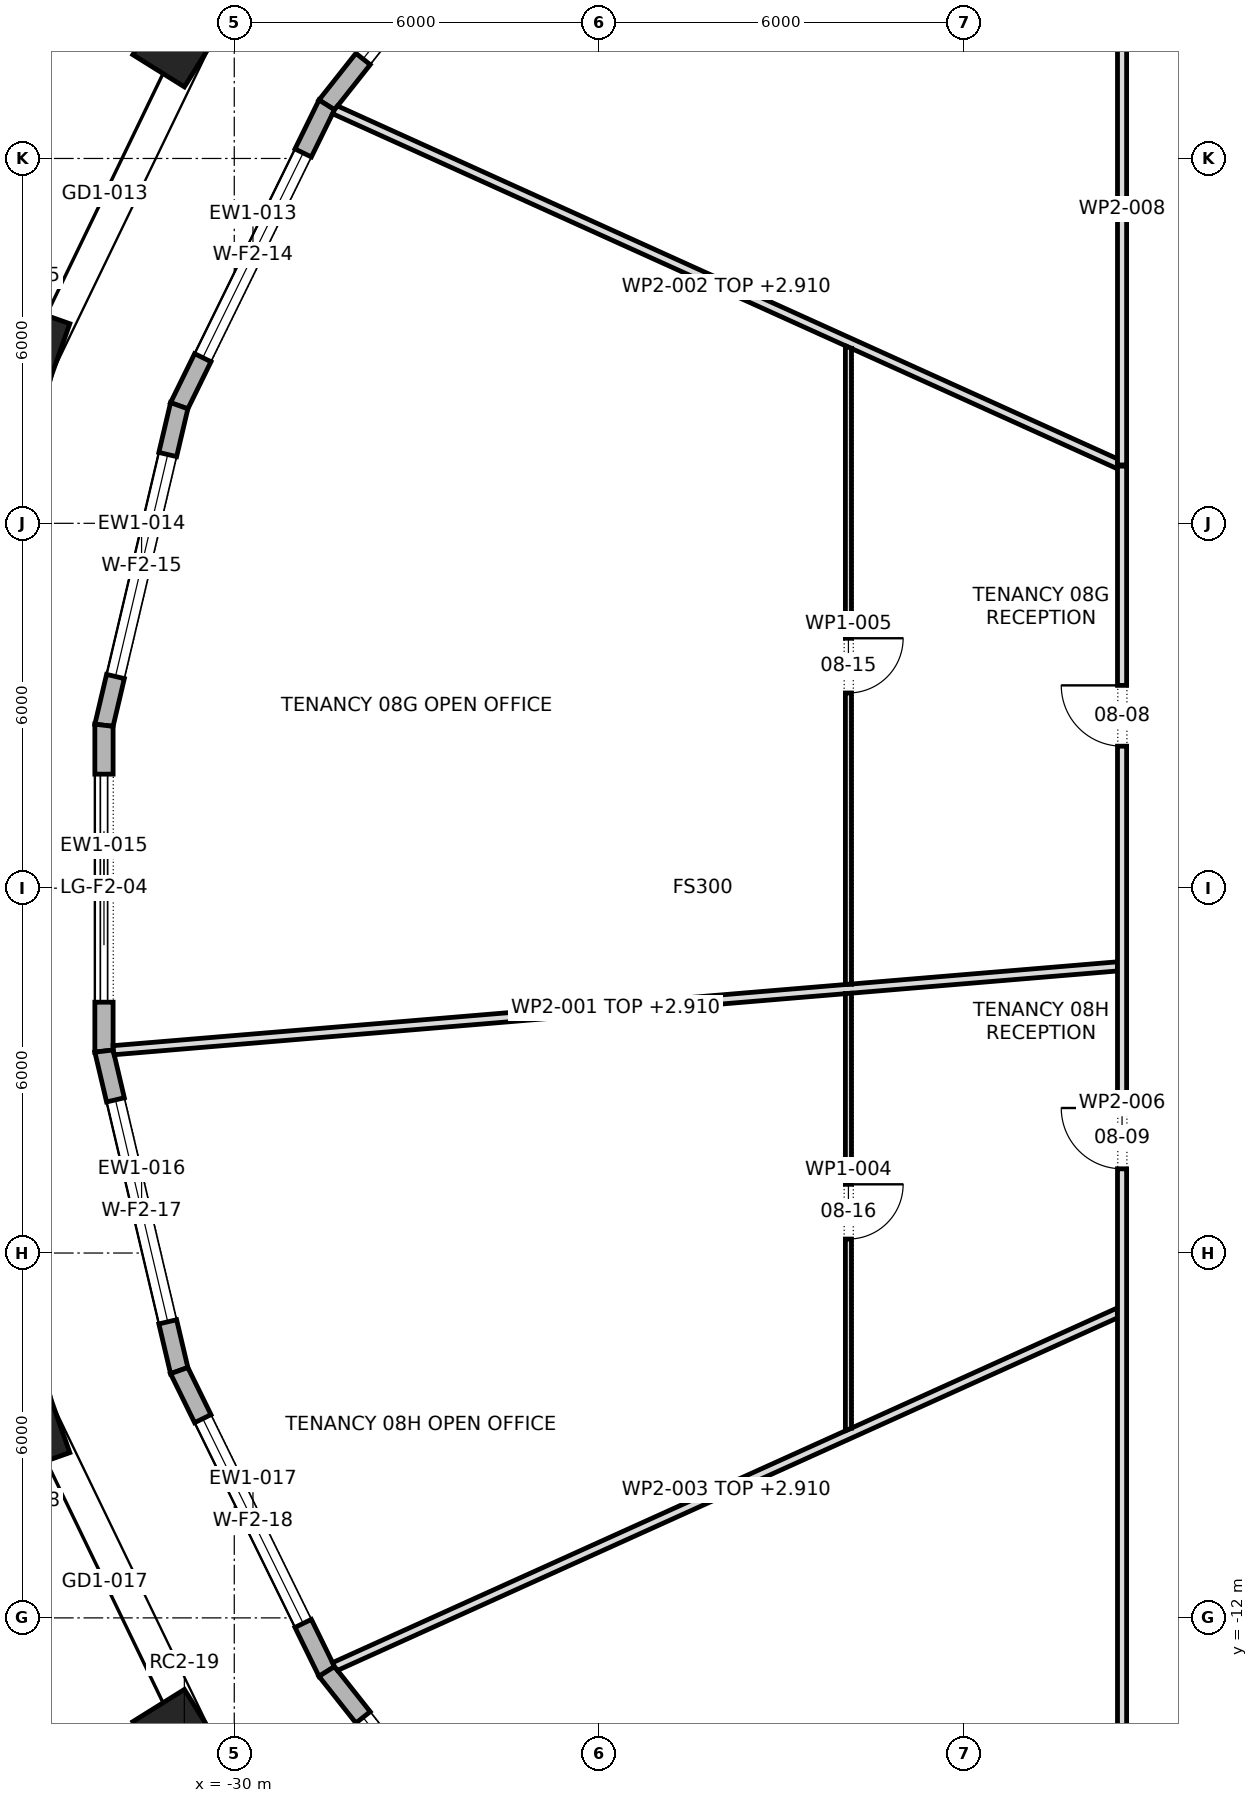
"""IFC4 building model, lengths in metres.
Left out: names, types, materials, properties, quantities, classifications, styles, units other than length and angle.
Written with IfcOpenShell. Run it as: python <this file> out.ifc"""

import sys

from ifc_helpers import new_model, si_unit, direction, frame, frame_2d, origin, origin_2d, place, context, subcontext, project, spatial, polyline, rectangle, outline, extrude, element, fill, save


model = new_model("IFC4")
c1 = context("Model", 3, precision=1e-05, world=origin(), true_north=direction((0.0, 1.0)))
c2 = subcontext(c1, "Body", "Model", "MODEL_VIEW")
j1 = project(units=[si_unit("LENGTHUNIT", "METRE"), si_unit("PLANEANGLEUNIT", "RADIAN")], contexts=[c1])
p1 = place(None, origin())
s1 = spatial("IfcSite", under=j1, at=p1, CompositionType="ELEMENT")
p2 = place(p1, origin())
s2 = spatial("IfcBuilding", under=s1, at=p2, CompositionType="ELEMENT")
p3 = place(p2, frame((0.0, 0.0, 117.1)))
s3 = spatial("IfcBuildingStorey", under=s2, at=p3, CompositionType="ELEMENT", Elevation=117.1)
for number, where, z_axis, x_axis in (
    (1, (-30.821, 14.121, 0.0), (0.0, 0.0, 1.0), (-0.529, -0.849, 0.0)),
    (2, (-33.443, 8.695, 0.0), (0.0, 0.0, 1.0), (-0.334, -0.943, 0.0)),
    (3, (-33.443, -8.695, 0.0), (0.0, 0.0, 1.0), (0.334, -0.943, 0.0)),
    (4, (-30.821, -14.121, 0.0), (0.0, 0.0, 1.0), (0.529, -0.849, 0.0)),
):
    element("IfcColumn", number, at=place(p3, frame(where, z_axis=z_axis, x_axis=x_axis)), inside=s3, PredefinedType="COLUMN", context=c2, shape_type="SweptSolid", body=[
        extrude(rectangle(XDim=1.6, YDim=1.0, at=origin_2d()), origin(), (0.0, 0.0, 1.0), 4.2),
    ])
p4 = place(p3, frame((-24.958, 17.332, 0.0), z_axis=(0.0, 0.0, 1.0), x_axis=(-0.62038332391, -0.784298751379, 0.0)))
e5 = element("IfcWall", 5, at=p4, inside=s3, PredefinedType="STANDARD", context=c2, shape_type="SweptSolid", body=[
    extrude(outline(polyline([(-0.015, -0.15), (5.691, -0.15), (5.659, 0.15), (0.015, 0.15), (-0.015, -0.15)])), origin(), (0.0, 0.0, 1.0), 3.9),
])
p5 = place(p4, frame((0.962, 0.0, 0.6)))
e6 = element("IfcOpeningElement", 6, at=p5, cuts=e5, PredefinedType="OPENING", context=c2, shape_type="SweptSolid", body=[
    extrude(rectangle(XDim=3.75, YDim=2.85, at=frame_2d((1.875, 1.425))), frame((0.0, 0.162, 0.0), z_axis=(0.0, -1.0, 0.0), x_axis=(1.0, 0.0, 0.0)), (0.0, 0.0, 1.0), 0.324),
])
p6 = place(p3, frame((-28.479, 12.881, 0.0), z_axis=(0.0, 0.0, 1.0), x_axis=(-0.440306401535, -0.897847577692, 0.0)))
e7 = element("IfcWall", 7, at=p6, inside=s3, PredefinedType="STANDARD", context=c2, shape_type="SweptSolid", body=[
    extrude(outline(polyline([(-0.016, -0.15), (5.527, -0.15), (5.494, 0.15), (0.016, 0.15), (-0.016, -0.15)])), origin(), (0.0, 0.0, 1.0), 3.9),
])
p7 = place(p6, frame((0.88, 0.0, 0.6)))
e8 = element("IfcOpeningElement", 8, at=p7, cuts=e7, PredefinedType="OPENING", context=c2, shape_type="SweptSolid", body=[
    extrude(rectangle(XDim=3.75, YDim=2.85, at=frame_2d((1.875, 1.425))), frame((0.0, 0.162, 0.0), z_axis=(0.0, -1.0, 0.0), x_axis=(1.0, 0.0, 0.0)), (0.0, 0.0, 1.0), 0.324),
])
p8 = place(p3, frame((-30.905, 7.934, 0.0), z_axis=(0.0, 0.0, 1.0), x_axis=(-0.229200658045, -0.973379195561, 0.0)))
e9 = element("IfcWall", 9, at=p8, inside=s3, PredefinedType="STANDARD", context=c2, shape_type="SweptSolid", body=[
    extrude(outline(polyline([(-0.017, -0.15), (5.416, -0.15), (5.381, 0.15), (0.017, 0.15), (-0.017, -0.15)])), origin(), (0.0, 0.0, 1.0), 3.9),
])
p9 = place(p8, frame((0.824, 0.0, 0.6)))
e10 = element("IfcOpeningElement", 10, at=p9, cuts=e9, PredefinedType="OPENING", context=c2, shape_type="SweptSolid", body=[
    extrude(rectangle(XDim=3.75, YDim=2.85, at=frame_2d((1.875, 1.425))), frame((0.0, 0.162, 0.0), z_axis=(0.0, -1.0, 0.0), x_axis=(1.0, 0.0, 0.0)), (0.0, 0.0, 1.0), 0.324),
])
p10 = place(p3, frame((-32.143, 2.679, 0.0), z_axis=(0.0, 0.0, 1.0), x_axis=(0.0, -1.0, 0.0)))
e11 = element("IfcWall", 11, at=p10, inside=s3, PredefinedType="STANDARD", context=c2, shape_type="SweptSolid", body=[
    extrude(outline(polyline([(-0.017, -0.15), (5.375, -0.15), (5.341, 0.15), (0.017, 0.15), (-0.017, -0.15)])), origin(), (0.0, 0.0, 1.0), 3.9),
])
p11 = place(p10, frame((0.804, 0.0, 0.0)))
e12 = element("IfcOpeningElement", 12, at=p11, cuts=e11, PredefinedType="OPENING", context=c2, shape_type="SweptSolid", body=[
    extrude(rectangle(XDim=3.75, YDim=3.45, at=frame_2d((1.875, 1.725))), frame((0.0, 0.162, 0.0), z_axis=(0.0, -1.0, 0.0), x_axis=(1.0, 0.0, 0.0)), (0.0, 0.0, 1.0), 0.324),
])
p12 = place(p3, frame((-32.143, -2.679, 0.0), z_axis=(0.0, 0.0, 1.0), x_axis=(0.229200658045, -0.973379195561, 0.0)))
e13 = element("IfcWall", 13, at=p12, inside=s3, PredefinedType="STANDARD", context=c2, shape_type="SweptSolid", body=[
    extrude(outline(polyline([(-0.017, -0.15), (5.415, -0.15), (5.382, 0.15), (0.017, 0.15), (-0.017, -0.15)])), origin(), (0.0, 0.0, 1.0), 3.9),
])
p13 = place(p12, frame((0.824, 0.0, 0.6)))
e14 = element("IfcOpeningElement", 14, at=p13, cuts=e13, PredefinedType="OPENING", context=c2, shape_type="SweptSolid", body=[
    extrude(rectangle(XDim=3.75, YDim=2.85, at=frame_2d((1.875, 1.425))), frame((0.0, 0.162, 0.0), z_axis=(0.0, -1.0, 0.0), x_axis=(1.0, 0.0, 0.0)), (0.0, 0.0, 1.0), 0.324),
])
p14 = place(p3, frame((-30.905, -7.934, 0.0), z_axis=(0.0, 0.0, 1.0), x_axis=(0.440306401535, -0.897847577692, 0.0)))
e15 = element("IfcWall", 15, at=p14, inside=s3, PredefinedType="STANDARD", context=c2, shape_type="SweptSolid", body=[
    extrude(outline(polyline([(-0.017, -0.15), (5.527, -0.15), (5.494, 0.15), (0.017, 0.15), (-0.017, -0.15)])), origin(), (0.0, 0.0, 1.0), 3.9),
])
p15 = place(p14, frame((0.88, 0.0, 0.6)))
e16 = element("IfcOpeningElement", 16, at=p15, cuts=e15, PredefinedType="OPENING", context=c2, shape_type="SweptSolid", body=[
    extrude(rectangle(XDim=3.75, YDim=2.85, at=frame_2d((1.875, 1.425))), frame((0.0, 0.162, 0.0), z_axis=(0.0, -1.0, 0.0), x_axis=(1.0, 0.0, 0.0)), (0.0, 0.0, 1.0), 0.324),
])
p16 = place(p3, frame((-28.479, -12.881, 0.0), z_axis=(0.0, 0.0, 1.0), x_axis=(0.62038332391, -0.784298751379, 0.0)))
e17 = element("IfcWall", 17, at=p16, inside=s3, PredefinedType="STANDARD", context=c2, shape_type="SweptSolid", body=[
    extrude(outline(polyline([(-0.016, -0.15), (5.69, -0.15), (5.66, 0.15), (0.016, 0.15), (-0.016, -0.15)])), origin(), (0.0, 0.0, 1.0), 3.9),
])
p17 = place(p16, frame((0.962, 0.0, 0.6)))
e18 = element("IfcOpeningElement", 18, at=p17, cuts=e17, PredefinedType="OPENING", context=c2, shape_type="SweptSolid", body=[
    extrude(rectangle(XDim=3.75, YDim=2.85, at=frame_2d((1.875, 1.425))), frame((0.0, 0.162, 0.0), z_axis=(0.0, -1.0, 0.0), x_axis=(1.0, 0.0, 0.0)), (0.0, 0.0, 1.0), 0.324),
])
p18 = place(p3, frame((-31.986, -2.665, 0.0), z_axis=(0.0, 0.0, 1.0), x_axis=(0.996533353756, 0.083194199634, 0.0)))
e19 = element("IfcWall", 19, at=p18, inside=s3, PredefinedType="PARTITIONING", context=c2, shape_type="SweptSolid", body=[
    extrude(outline(polyline([(0.006, -0.075), (1.729, -0.075), (3.453, -0.075), (5.177, -0.075), (6.901, -0.075), (8.625, -0.075), (10.348, -0.075), (12.072, -0.075), (12.072, -0.075), (12.074, -0.075), (13.57, -0.075), (15.066, -0.075), (16.562, -0.075), (16.574, 0.068), (16.574, 0.075), (15.111, 0.075), (13.648, 0.075), (12.185, 0.075), (12.185, 0.074), (12.172, 0.075), (10.433, 0.075), (8.694, 0.075), (6.955, 0.075), (5.216, 0.075), (3.478, 0.075), (1.739, 0.075), (0.0, 0.075), (0.0, -0.036), (0.006, -0.075)])), origin(), (0.0, 0.0, 1.0), 2.91),
])
p19 = place(p3, frame((-28.352, 12.804, 0.0), z_axis=(0.0, 0.0, 1.0), x_axis=(0.91107802929, -0.412233943951, 0.0)))
e20 = element("IfcWall", 20, at=p19, inside=s3, PredefinedType="PARTITIONING", context=c2, shape_type="SweptSolid", body=[
    extrude(outline(polyline([(0.0, -0.075), (1.872, -0.075), (3.744, -0.075), (5.616, -0.075), (7.488, -0.075), (9.36, -0.075), (9.365, -0.073), (9.365, -0.075), (10.966, -0.075), (12.567, -0.075), (14.167, -0.075), (14.167, -0.075), (14.145, -0.025), (14.1, 0.075), (12.34, 0.075), (10.58, 0.075), (8.82, 0.075), (7.06, 0.075), (5.301, 0.075), (3.541, 0.075), (1.781, 0.075), (0.021, 0.075), (0.002, -0.003), (0.0, -0.059), (0.0, -0.075)])), origin(), (0.0, 0.0, 1.0), 2.91),
])
p20 = place(p3, frame((-28.352, -12.804, 0.0), z_axis=(0.0, 0.0, 1.0), x_axis=(0.911239169411, 0.41187762276, 0.0)))
e21 = element("IfcWall", 21, at=p20, inside=s3, PredefinedType="PARTITIONING", context=c2, shape_type="SweptSolid", body=[
    extrude(outline(polyline([(0.022, -0.075), (1.781, -0.075), (3.541, -0.075), (5.3, -0.075), (7.06, -0.075), (8.819, -0.075), (10.579, -0.075), (12.338, -0.075), (14.098, -0.075), (14.166, 0.075), (12.565, 0.075), (10.965, 0.075), (9.364, 0.075), (9.364, 0.074), (9.362, 0.075), (7.49, 0.075), (5.617, 0.075), (3.745, 0.075), (1.873, 0.075), (0.0, 0.075), (0.0, 0.074), (0.002, 0.003), (0.022, -0.075)])), origin(), (0.0, 0.0, 1.0), 2.91),
])
p21 = place(p3, frame((-19.9, -8.924, 0.0), z_axis=(0.0, 0.0, 1.0), x_axis=(0.0, 1.0, 0.0)))
e22 = element("IfcWall", 22, at=p21, inside=s3, PredefinedType="PARTITIONING", context=c2, shape_type="SweptSolid", body=[
    extrude(outline(polyline([(7.197, -0.05), (7.197, -0.046), (7.189, 0.05), (5.392, 0.05), (3.594, 0.05), (1.797, 0.05), (0.0, 0.05), (0.0, 0.05), (0.045, -0.05), (1.833, -0.05), (3.621, -0.05), (5.409, -0.05), (7.197, -0.05)])), origin(), (0.0, 0.0, 1.0), 3.9),
])
p22 = place(p21, frame((3.154, 0.0, 0.0)))
e23 = element("IfcOpeningElement", 23, at=p22, cuts=e22, PredefinedType="OPENING", context=c2, shape_type="SweptSolid", body=[
    extrude(rectangle(XDim=0.9, YDim=2.1, at=frame_2d((0.45, 1.05))), frame((0.0, 0.062, 0.0), z_axis=(0.0, -1.0, 0.0), x_axis=(1.0, 0.0, 0.0)), (0.0, 0.0, 1.0), 0.124),
])
p23 = place(p3, frame((-19.9, -1.584, 0.0), z_axis=(0.0, 0.0, 1.0), x_axis=(0.0, 1.0, 0.0)))
e24 = element("IfcWall", 24, at=p23, inside=s3, PredefinedType="PARTITIONING", context=c2, shape_type="SweptSolid", body=[
    extrude(outline(polyline([(0.008, -0.05), (1.75, -0.05), (3.492, -0.05), (5.234, -0.05), (6.976, -0.05), (8.718, -0.05), (10.459, -0.05), (10.504, 0.049), (10.504, 0.05), (8.754, 0.05), (7.003, 0.05), (5.252, 0.05), (3.501, 0.05), (1.751, 0.05), (0.0, 0.05), (0.0, 0.048), (0.008, -0.05)])), origin(), (0.0, 0.0, 1.0), 3.9),
])
p24 = place(p23, frame((4.794, 0.0, 0.0)))
e25 = element("IfcOpeningElement", 25, at=p24, cuts=e24, PredefinedType="OPENING", context=c2, shape_type="SweptSolid", body=[
    extrude(rectangle(XDim=0.9, YDim=2.1, at=frame_2d((0.45, 1.05))), frame((0.0, 0.062, 0.0), z_axis=(0.0, -1.0, 0.0), x_axis=(1.0, 0.0, 0.0)), (0.0, 0.0, 1.0), 0.124),
])
p25 = place(p3, frame((-15.4, -15.475, 0.0), z_axis=(0.0, 0.0, 1.0), x_axis=(0.0, 1.0, 0.0)))
e26 = element("IfcWall", 26, at=p25, inside=s3, PredefinedType="PARTITIONING", context=c2, shape_type="SweptSolid", body=[
    extrude(outline(polyline([(22.425, 0.075), (20.556, 0.075), (18.688, 0.075), (16.819, 0.075), (14.95, 0.075), (13.081, 0.075), (11.213, 0.075), (9.344, 0.075), (7.475, 0.075), (5.606, 0.075), (3.738, 0.075), (1.869, 0.075), (0.0, 0.075), (0.15, -0.075), (2.006, -0.075), (3.863, -0.075), (5.719, -0.075), (7.575, -0.075), (9.431, -0.075), (11.288, -0.075), (13.144, -0.075), (15.0, -0.075), (16.856, -0.075), (18.713, -0.075), (20.569, -0.075), (22.425, -0.075), (22.425, 0.075)])), origin(), (0.0, 0.0, 1.0), 3.9),
])
p26 = place(p25, frame((17.81, 0.0, 0.0)))
e27 = element("IfcOpeningElement", 27, at=p26, cuts=e26, PredefinedType="OPENING", context=c2, shape_type="SweptSolid", body=[
    extrude(rectangle(XDim=1.0, YDim=2.1, at=frame_2d((0.5, 1.05))), frame((0.0, 0.087, 0.0), z_axis=(0.0, -1.0, 0.0), x_axis=(1.0, 0.0, 0.0)), (0.0, 0.0, 1.0), 0.174),
])
p27 = place(p25, frame((10.86, 0.0, 0.0)))
e28 = element("IfcOpeningElement", 28, at=p27, cuts=e26, PredefinedType="OPENING", context=c2, shape_type="SweptSolid", body=[
    extrude(rectangle(XDim=1.0, YDim=2.1, at=frame_2d((0.5, 1.05))), frame((0.0, 0.087, 0.0), z_axis=(0.0, -1.0, 0.0), x_axis=(1.0, 0.0, 0.0)), (0.0, 0.0, 1.0), 0.174),
])
p28 = place(p3, frame((-15.4, 6.95, 0.0), z_axis=(0.0, 0.0, 1.0), x_axis=(0.0, 1.0, 0.0)))
e29 = element("IfcWall", 29, at=p28, inside=s3, PredefinedType="PARTITIONING", context=c2, shape_type="SweptSolid", body=[
    extrude(outline(polyline([(0.0, -0.075), (1.675, -0.075), (3.35, -0.075), (5.025, -0.075), (6.7, -0.075), (8.375, -0.075), (8.525, 0.075), (6.82, 0.075), (5.115, 0.075), (3.41, 0.075), (1.705, 0.075), (0.0, 0.075), (0.0, -0.075)])), origin(), (0.0, 0.0, 1.0), 3.9),
])
p29 = place(p5, origin())
e30 = element("IfcWindow", 30, at=p29, inside=s3, PartitioningType="TRIPLE_PANEL_VERTICAL", PredefinedType="WINDOW", context=c2, shape_type="SweptSolid", body=[
    extrude(rectangle(XDim=3.75, YDim=2.85, at=frame_2d((1.875, 1.425))), frame((0.0, 0.03, 0.0), z_axis=(0.0, -1.0, 0.0), x_axis=(1.0, 0.0, 0.0)), (0.0, 0.0, 1.0), 0.06),
])
fill(e6, e30)
p30 = place(p7, origin())
e31 = element("IfcWindow", 31, at=p30, inside=s3, PartitioningType="TRIPLE_PANEL_VERTICAL", PredefinedType="WINDOW", context=c2, shape_type="SweptSolid", body=[
    extrude(rectangle(XDim=3.75, YDim=2.85, at=frame_2d((1.875, 1.425))), frame((0.0, 0.03, 0.0), z_axis=(0.0, -1.0, 0.0), x_axis=(1.0, 0.0, 0.0)), (0.0, 0.0, 1.0), 0.06),
])
fill(e8, e31)
p31 = place(p9, origin())
e32 = element("IfcWindow", 32, at=p31, inside=s3, PartitioningType="TRIPLE_PANEL_VERTICAL", PredefinedType="WINDOW", context=c2, shape_type="SweptSolid", body=[
    extrude(rectangle(XDim=3.75, YDim=2.85, at=frame_2d((1.875, 1.425))), frame((0.0, 0.03, 0.0), z_axis=(0.0, -1.0, 0.0), x_axis=(1.0, 0.0, 0.0)), (0.0, 0.0, 1.0), 0.06),
])
fill(e10, e32)
p32 = place(p11, origin())
e33 = element("IfcDoor", 33, at=p32, inside=s3, OperationType="DOUBLE_DOOR_SLIDING", PredefinedType="DOOR", context=c2, shape_type="SweptSolid", body=[
    extrude(rectangle(XDim=3.75, YDim=3.45, at=frame_2d((1.875, 1.725))), frame((0.0, 0.025, 0.0), z_axis=(0.0, -1.0, 0.0), x_axis=(1.0, 0.0, 0.0)), (0.0, 0.0, 1.0), 0.05),
])
fill(e12, e33)
p33 = place(p13, origin())
e34 = element("IfcWindow", 34, at=p33, inside=s3, PartitioningType="TRIPLE_PANEL_VERTICAL", PredefinedType="WINDOW", context=c2, shape_type="SweptSolid", body=[
    extrude(rectangle(XDim=3.75, YDim=2.85, at=frame_2d((1.875, 1.425))), frame((0.0, 0.03, 0.0), z_axis=(0.0, -1.0, 0.0), x_axis=(1.0, 0.0, 0.0)), (0.0, 0.0, 1.0), 0.06),
])
fill(e14, e34)
p34 = place(p15, origin())
e35 = element("IfcWindow", 35, at=p34, inside=s3, PartitioningType="TRIPLE_PANEL_VERTICAL", PredefinedType="WINDOW", context=c2, shape_type="SweptSolid", body=[
    extrude(rectangle(XDim=3.75, YDim=2.85, at=frame_2d((1.875, 1.425))), frame((0.0, 0.03, 0.0), z_axis=(0.0, -1.0, 0.0), x_axis=(1.0, 0.0, 0.0)), (0.0, 0.0, 1.0), 0.06),
])
fill(e16, e35)
p35 = place(p17, origin())
e36 = element("IfcWindow", 36, at=p35, inside=s3, PartitioningType="TRIPLE_PANEL_VERTICAL", PredefinedType="WINDOW", context=c2, shape_type="SweptSolid", body=[
    extrude(rectangle(XDim=3.75, YDim=2.85, at=frame_2d((1.875, 1.425))), frame((0.0, 0.03, 0.0), z_axis=(0.0, -1.0, 0.0), x_axis=(1.0, 0.0, 0.0)), (0.0, 0.0, 1.0), 0.06),
])
fill(e18, e36)
p36 = place(p26, origin())
e37 = element("IfcDoor", 37, at=p36, inside=s3, OperationType="SINGLE_SWING_LEFT", PredefinedType="DOOR", context=c2, shape_type="SweptSolid", body=[
    extrude(rectangle(XDim=1.0, YDim=2.1, at=frame_2d((0.5, 1.05))), frame((0.0, 0.025, 0.0), z_axis=(0.0, -1.0, 0.0), x_axis=(1.0, 0.0, 0.0)), (0.0, 0.0, 1.0), 0.05),
])
fill(e27, e37)
p37 = place(p27, origin())
e38 = element("IfcDoor", 38, at=p37, inside=s3, OperationType="SINGLE_SWING_LEFT", PredefinedType="DOOR", context=c2, shape_type="SweptSolid", body=[
    extrude(rectangle(XDim=1.0, YDim=2.1, at=frame_2d((0.5, 1.05))), frame((0.0, 0.025, 0.0), z_axis=(0.0, -1.0, 0.0), x_axis=(1.0, 0.0, 0.0)), (0.0, 0.0, 1.0), 0.05),
])
fill(e28, e38)
p38 = place(p24, frame((0.9, 0.0, 0.0), z_axis=(0.0, 0.0, 1.0), x_axis=(-1.0, 0.0, 0.0)))
e39 = element("IfcDoor", 39, at=p38, inside=s3, OperationType="SINGLE_SWING_RIGHT", PredefinedType="DOOR", context=c2, shape_type="SweptSolid", body=[
    extrude(rectangle(XDim=0.9, YDim=2.1, at=frame_2d((0.45, 1.05))), frame((0.0, 0.025, 0.0), z_axis=(0.0, -1.0, 0.0), x_axis=(1.0, 0.0, 0.0)), (0.0, 0.0, 1.0), 0.05),
])
fill(e25, e39)
p39 = place(p22, frame((0.9, 0.0, 0.0), z_axis=(0.0, 0.0, 1.0), x_axis=(-1.0, 0.0, 0.0)))
e40 = element("IfcDoor", 40, at=p39, inside=s3, OperationType="SINGLE_SWING_RIGHT", PredefinedType="DOOR", context=c2, shape_type="SweptSolid", body=[
    extrude(rectangle(XDim=0.9, YDim=2.1, at=frame_2d((0.45, 1.05))), frame((0.0, 0.025, 0.0), z_axis=(0.0, -1.0, 0.0), x_axis=(1.0, 0.0, 0.0)), (0.0, 0.0, 1.0), 0.05),
])
fill(e23, e40)
save(model, sys.argv[1])
